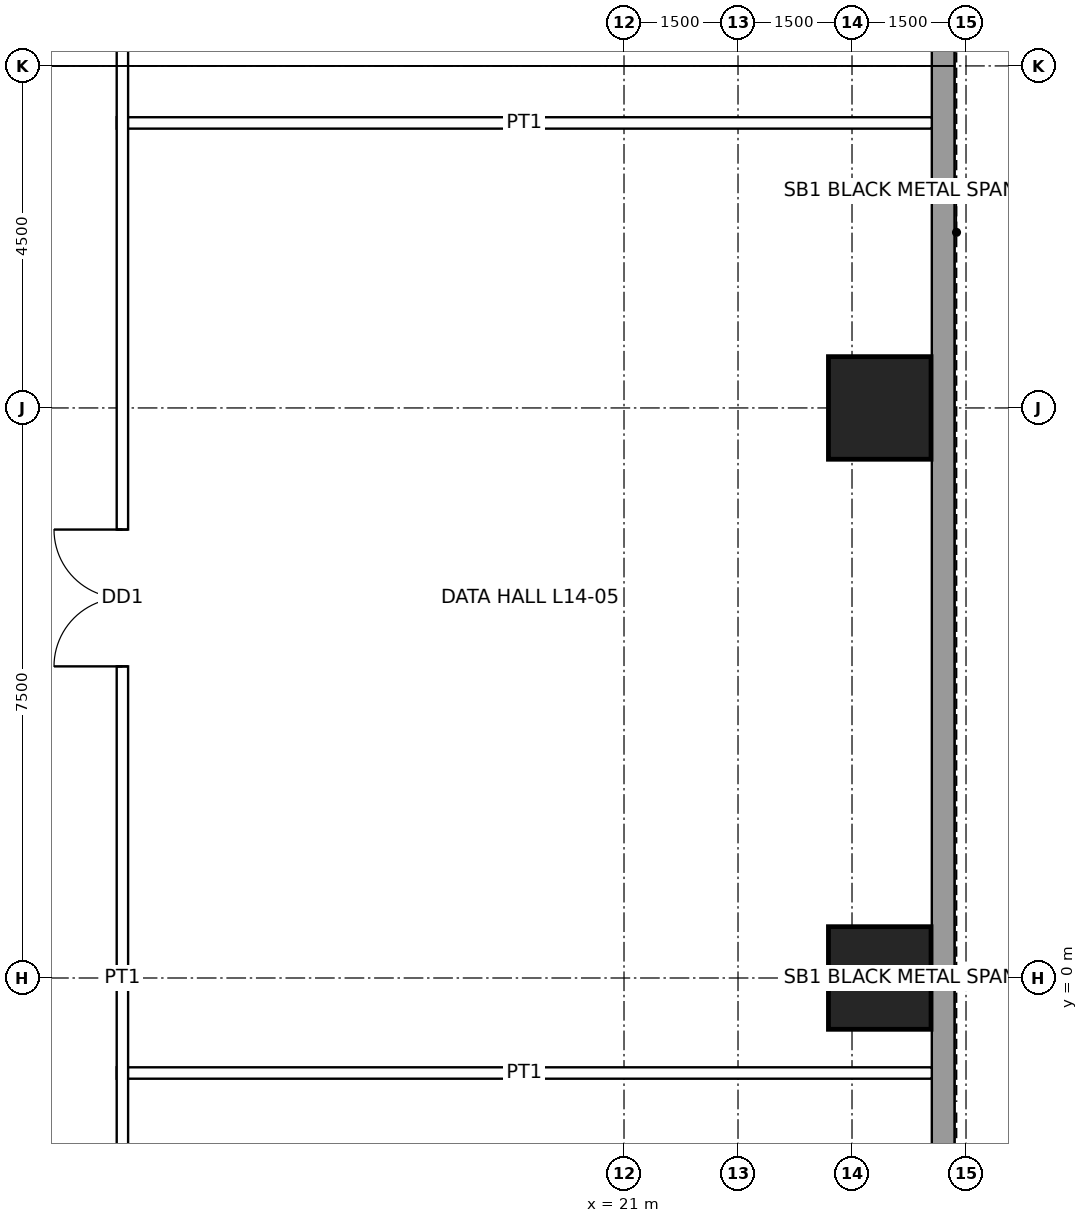
"""IFC4 building model, lengths in metres.
Left out: names, types, materials, properties, quantities, classifications, styles, units other than length and angle.
Written with IfcOpenShell. Run it as: python <this file> out.ifc"""

import sys

from ifc_helpers import new_model, si_unit, direction, frame, frame_2d, origin, origin_2d, place, context, subcontext, project, spatial, rectangle, hollow_rectangle, extrude, element, fill, save


model = new_model("IFC4")
c1 = context("Model", 3, precision=1e-05, world=origin(), true_north=direction((0.0, 1.0)))
c2 = subcontext(c1, "Body", "Model", "MODEL_VIEW")
j1 = project(units=[si_unit("LENGTHUNIT", "METRE"), si_unit("PLANEANGLEUNIT", "RADIAN")], contexts=[c1])
p1 = place(None, origin())
s1 = spatial("IfcSite", under=j1, at=p1, CompositionType="ELEMENT")
p2 = place(p1, origin())
s2 = spatial("IfcBuilding", under=s1, at=p2, CompositionType="ELEMENT")
p3 = place(p2, frame((0.0, 0.0, 73.4)))
s3 = spatial("IfcBuildingStorey", under=s2, at=p3, CompositionType="ELEMENT", Elevation=73.4)
for number, where, z_axis, x_axis in (
    (1, (24.365, 7.5, 0.0), (0.0, 0.0, 1.0), (1.0, 0.0, 0.0)),
    (2, (24.365, 0.0, 0.0), (0.0, 0.0, 1.0), (1.0, 0.0, 0.0)),
):
    element("IfcColumn", number, at=place(p3, frame(where, z_axis=z_axis, x_axis=x_axis)), inside=s3, PredefinedType="COLUMN", context=c2, shape_type="SweptSolid", body=[
        extrude(hollow_rectangle(XDim=1.35, YDim=1.35, WallThickness=0.085, at=origin_2d()), origin(), (0.0, 0.0, 1.0), 5.0),
    ])
p4 = place(p3, frame((25.2, 17.7, 0.0), z_axis=(0.0, 0.0, 1.0), x_axis=(0.0, -1.0, 0.0)))
e3 = element("IfcWall", 3, at=p4, inside=s3, PredefinedType="SOLIDWALL", context=c2, shape_type="SweptSolid", body=[
    extrude(rectangle(XDim=35.4, YDim=0.3, at=frame_2d((17.7, 0.0))), origin(), (0.0, 0.0, 1.0), 4.8),
])
p5 = place(p3, frame((14.325, -1.25, 0.0), z_axis=(0.0, 0.0, 1.0), x_axis=(1.0, 0.0, 0.0)))
e4 = element("IfcWall", 4, at=p5, inside=s3, PredefinedType="PARTITIONING", context=c2, shape_type="SweptSolid", body=[
    extrude(rectangle(XDim=10.725, YDim=0.15, at=frame_2d((5.363, 0.0))), origin(), (0.0, 0.0, 1.0), 4.8),
])
p6 = place(p3, frame((14.325, 11.25, 0.0), z_axis=(0.0, 0.0, 1.0), x_axis=(1.0, 0.0, 0.0)))
e5 = element("IfcWall", 5, at=p6, inside=s3, PredefinedType="PARTITIONING", context=c2, shape_type="SweptSolid", body=[
    extrude(rectangle(XDim=10.725, YDim=0.15, at=frame_2d((5.363, 0.0))), origin(), (0.0, 0.0, 1.0), 3.853),
])
p7 = place(p3, frame((14.4, -14.475, 0.0), z_axis=(0.0, 0.0, 1.0), x_axis=(0.0, 1.0, 0.0)))
e6 = element("IfcWall", 6, at=p7, inside=s3, PredefinedType="PARTITIONING", context=c2, shape_type="SweptSolid", body=[
    extrude(rectangle(XDim=28.95, YDim=0.15, at=frame_2d((14.475, 0.0))), origin(), (0.0, 0.0, 1.0), 4.8),
])
p8 = place(p7, frame((18.575, 0.0, 0.0)))
e7 = element("IfcOpeningElement", 7, at=p8, cuts=e6, PredefinedType="OPENING", context=c2, shape_type="SweptSolid", body=[
    extrude(rectangle(XDim=1.8, YDim=2.4, at=frame_2d((0.9, 1.2))), frame((0.0, 0.085, 0.0), z_axis=(0.0, -1.0, 0.0), x_axis=(1.0, 0.0, 0.0)), (0.0, 0.0, 1.0), 0.17),
])
p9 = place(p7, frame((7.325, 0.0, 0.0)))
e8 = element("IfcOpeningElement", 8, at=p9, cuts=e6, PredefinedType="OPENING", context=c2, shape_type="SweptSolid", body=[
    extrude(rectangle(XDim=1.8, YDim=2.4, at=frame_2d((0.9, 1.2))), frame((0.0, 0.085, 0.0), z_axis=(0.0, -1.0, 0.0), x_axis=(1.0, 0.0, 0.0)), (0.0, 0.0, 1.0), 0.17),
])
p10 = place(p8, origin())
e9 = element("IfcDoor", 9, at=p10, inside=s3, OperationType="DOUBLE_DOOR_SINGLE_SWING", PredefinedType="DOOR", context=c2, shape_type="SweptSolid", body=[
    extrude(rectangle(XDim=1.8, YDim=2.4, at=frame_2d((0.9, 1.2))), frame((0.0, 0.025, 0.0), z_axis=(0.0, -1.0, 0.0), x_axis=(1.0, 0.0, 0.0)), (0.0, 0.0, 1.0), 0.05),
])
fill(e7, e9)
save(model, sys.argv[1])
